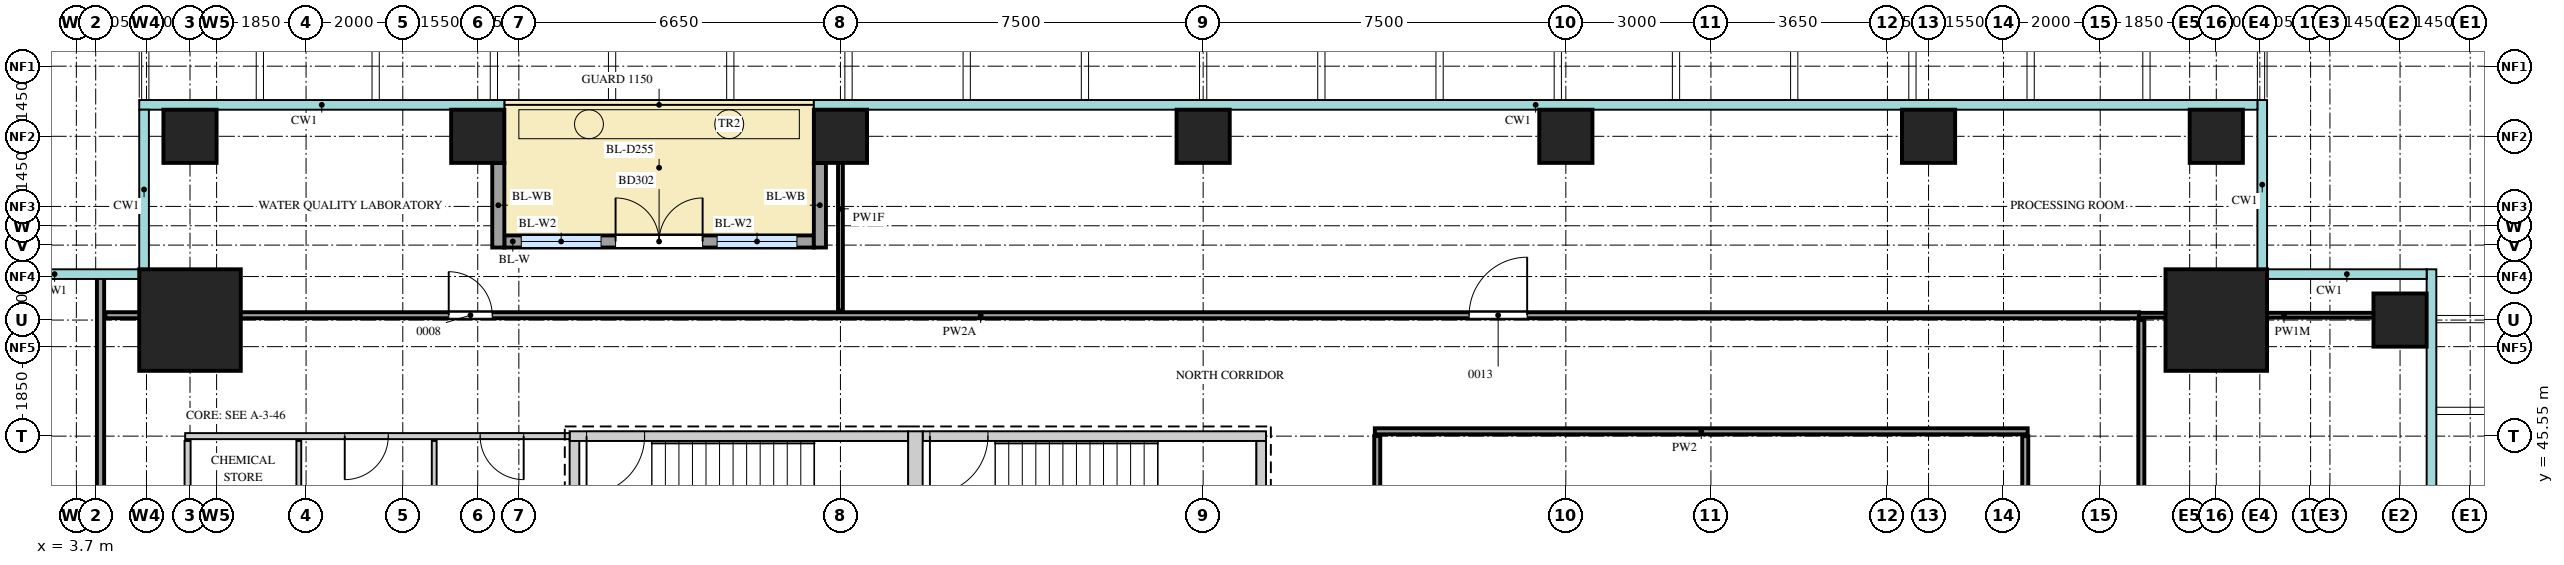
"""IFC4 building model, lengths in metres.
Left out: names, types, materials, properties, quantities, classifications, styles, units other than length and angle.
Written with IfcOpenShell. Run it as: python <this file> out.ifc"""

import sys

from ifc_helpers import new_model, si_unit, direction, frame, frame_2d, origin, origin_2d, place, context, subcontext, project, spatial, rectangle, extrude, source, transform, mapped, element, fill, save


model = new_model("IFC4")
c1 = context("Model", 3, precision=1e-05, world=origin(), true_north=direction((0.0, 1.0)))
c2 = subcontext(c1, "Body", "Model", "MODEL_VIEW")
j1 = project(units=[si_unit("LENGTHUNIT", "METRE"), si_unit("PLANEANGLEUNIT", "RADIAN")], contexts=[c1])
p1 = place(None, origin())
s1 = spatial("IfcSite", under=j1, at=p1, CompositionType="ELEMENT")
p2 = place(p1, origin())
s2 = spatial("IfcBuilding", under=s1, at=p2, CompositionType="ELEMENT")
p3 = place(p2, frame((0.0, 0.0, 141.1)))
s3 = spatial("IfcBuildingStorey", under=s2, at=p3, CompositionType="ELEMENT", Elevation=141.1)
m1 = source(origin(), c2, "Body", "SweptSolid", [
    extrude(rectangle(XDim=7.0, YDim=0.2, at=frame_2d((3.5, 0.0))), origin(), (0.0, 0.0, 1.0), 4.1),
])
p4 = place(p3, frame((13.9, 45.55, 0.0), z_axis=(0.0, 0.0, 1.0), x_axis=(1.0, 0.0, 0.0)))
e1 = element("IfcWall", 1, at=p4, inside=s3, PredefinedType="SHEAR", context=c2, shape_type="MappedRepresentation", body=[
    mapped(m1, transform((0.0, 0.0, 0.0))),
])
m2 = source(origin(), c2, "Body", "SweptSolid", [
    extrude(rectangle(XDim=1.2, YDim=2.1, at=frame_2d((0.6, 1.05))), frame((0.0, 0.11, 0.0), z_axis=(0.0, -1.0, 0.0), x_axis=(1.0, 0.0, 0.0)), (0.0, 0.0, 1.0), 0.22),
])
p5 = place(p4, frame((0.35, 0.0, 0.0)))
e2 = element("IfcOpeningElement", 2, at=p5, cuts=e1, PredefinedType="OPENING", context=c2, shape_type="MappedRepresentation", body=[
    mapped(m2, transform((0.0, 0.0, 0.0))),
])
m3 = source(origin(), c2, "Body", "SweptSolid", [
    extrude(rectangle(XDim=7.1, YDim=0.2, at=frame_2d((3.55, 0.0))), origin(), (0.0, 0.0, 1.0), 4.1),
])
p6 = place(p3, frame((21.2, 45.55, 0.0), z_axis=(0.0, 0.0, 1.0), x_axis=(1.0, 0.0, 0.0)))
e3 = element("IfcWall", 3, at=p6, inside=s3, PredefinedType="SHEAR", context=c2, shape_type="MappedRepresentation", body=[
    mapped(m3, transform((0.0, 0.0, 0.0))),
])
p7 = place(p6, frame((0.15, 0.0, 0.0)))
e4 = element("IfcOpeningElement", 4, at=p7, cuts=e3, PredefinedType="OPENING", context=c2, shape_type="MappedRepresentation", body=[
    mapped(m2, transform((0.0, 0.0, 0.0))),
])
m4 = source(origin(), c2, "Body", "SweptSolid", [
    extrude(rectangle(XDim=3.75, YDim=0.3, at=frame_2d((1.875, 0.0))), origin(), (0.0, 0.0, 1.0), 4.1),
])
p8 = place(p3, frame((21.05, 41.9, 0.0), z_axis=(0.0, 0.0, 1.0), x_axis=(0.0, 1.0, 0.0)))
e5 = element("IfcWall", 5, at=p8, inside=s3, PredefinedType="SHEAR", context=c2, shape_type="MappedRepresentation", body=[
    mapped(m4, transform((0.0, 0.0, 0.0))),
])
m5 = source(origin(), c2, "Body", "SweptSolid", [
    extrude(rectangle(XDim=3.35, YDim=0.2, at=frame_2d((1.675, 0.0))), origin(), (0.0, 0.0, 1.0), 4.1),
])
for number, where, z_axis, x_axis in (
    (6, (14.0, 42.1, 0.0), (0.0, 0.0, 1.0), (0.0, 1.0, 0.0)),
    (7, (28.2, 42.1, 0.0), (0.0, 0.0, 1.0), (0.0, 1.0, 0.0)),
):
    element("IfcWall", number, at=place(p3, frame(where, z_axis=z_axis, x_axis=x_axis)), inside=s3, PredefinedType="SHEAR", context=c2, shape_type="MappedRepresentation", body=[
        mapped(m5, transform((0.0, 0.0, 0.0))),
    ])
m6 = source(origin(), c2, "Body", "SweptSolid", [
    extrude(rectangle(XDim=2.1, YDim=2.1, at=origin_2d()), origin(), (0.0, 0.0, 1.0), 4.4),
])
for number, where, z_axis, x_axis in (
    (8, (47.95, 47.95, 0.0), (0.0, 0.0, 1.0), (1.0, 0.0, 0.0)),
    (9, (6.05, 47.95, 0.0), (0.0, 0.0, 1.0), (1.0, 0.0, 0.0)),
):
    element("IfcColumn", number, at=place(p3, frame(where, z_axis=z_axis, x_axis=x_axis)), inside=s3, PredefinedType="COLUMN", context=c2, shape_type="MappedRepresentation", body=[
        mapped(m6, transform((0.0, 0.0, 0.0))),
    ])
m7 = source(origin(), c2, "Body", "SweptSolid", [
    extrude(rectangle(XDim=1.1, YDim=1.1, at=origin_2d()), origin(), (0.0, 0.0, 1.0), 4.1),
])
for number, where, z_axis, x_axis in (
    (10, (51.75, 47.95, 0.0), (0.0, 0.0, 1.0), (1.0, 0.0, 0.0)),
    (11, (6.05, 51.75, 0.0), (0.0, 0.0, 1.0), (1.0, 0.0, 0.0)),
    (12, (12.0, 51.75, 0.0), (0.0, 0.0, 1.0), (1.0, 0.0, 0.0)),
    (13, (19.5, 51.75, 0.0), (0.0, 0.0, 1.0), (1.0, 0.0, 0.0)),
    (14, (27.0, 51.75, 0.0), (0.0, 0.0, 1.0), (1.0, 0.0, 0.0)),
    (15, (34.5, 51.75, 0.0), (0.0, 0.0, 1.0), (1.0, 0.0, 0.0)),
    (16, (42.0, 51.75, 0.0), (0.0, 0.0, 1.0), (1.0, 0.0, 0.0)),
    (17, (47.95, 51.75, 0.0), (0.0, 0.0, 1.0), (1.0, 0.0, 0.0)),
):
    element("IfcColumn", number, at=place(p3, frame(where, z_axis=z_axis, x_axis=x_axis)), inside=s3, PredefinedType="COLUMN", context=c2, shape_type="MappedRepresentation", body=[
        mapped(m7, transform((0.0, 0.0, 0.0))),
    ])
m8 = source(origin(), c2, "Body", "SweptSolid", [
    extrude(rectangle(XDim=6.4, YDim=0.25, at=frame_2d((3.2, 0.0))), origin(), (0.0, 0.0, 1.0), 4.1),
])
p9 = place(p3, frame((12.55, 49.575, 0.0), z_axis=(0.0, 0.0, 1.0), x_axis=(1.0, 0.0, 0.0)))
e18 = element("IfcWall", 18, at=p9, inside=s3, PredefinedType="SOLIDWALL", context=c2, shape_type="MappedRepresentation", body=[
    mapped(m8, transform((0.0, 0.0, 0.0))),
])
m9 = source(origin(), c2, "Body", "SweptSolid", [
    extrude(rectangle(XDim=1.65, YDim=2.4, at=frame_2d((0.825, 1.2))), frame((0.0, 0.135, 0.0), z_axis=(0.0, -1.0, 0.0), x_axis=(1.0, 0.0, 0.0)), (0.0, 0.0, 1.0), 0.27),
])
p10 = place(p9, frame((0.35, 0.0, 0.0)))
e19 = element("IfcOpeningElement", 19, at=p10, cuts=e18, PredefinedType="OPENING", context=c2, shape_type="MappedRepresentation", body=[
    mapped(m9, transform((0.0, 0.0, 0.0))),
])
p11 = place(p9, frame((4.4, 0.0, 0.0)))
e20 = element("IfcOpeningElement", 20, at=p11, cuts=e18, PredefinedType="OPENING", context=c2, shape_type="MappedRepresentation", body=[
    mapped(m9, transform((0.0, 0.0, 0.0))),
])
m10 = source(origin(), c2, "Body", "SweptSolid", [
    extrude(rectangle(XDim=1.8, YDim=2.4, at=frame_2d((0.9, 1.2))), frame((0.0, 0.135, 0.0), z_axis=(0.0, -1.0, 0.0), x_axis=(1.0, 0.0, 0.0)), (0.0, 0.0, 1.0), 0.27),
])
p12 = place(p9, frame((2.3, 0.0, 0.0)))
e21 = element("IfcOpeningElement", 21, at=p12, cuts=e18, PredefinedType="OPENING", context=c2, shape_type="MappedRepresentation", body=[
    mapped(m10, transform((0.0, 0.0, 0.0))),
])
m11 = source(origin(), c2, "Body", "SweptSolid", [
    extrude(rectangle(XDim=1.75, YDim=0.25, at=frame_2d((0.875, 0.0))), origin(), (0.0, 0.0, 1.0), 3.8),
])
for number, where, z_axis, x_axis in (
    (22, (12.425, 51.2, 0.0), (0.0, 0.0, 1.0), (0.0, -1.0, 0.0)),
    (23, (19.075, 51.2, 0.0), (0.0, 0.0, 1.0), (0.0, -1.0, 0.0)),
):
    element("IfcWall", number, at=place(p3, frame(where, z_axis=z_axis, x_axis=x_axis)), inside=s3, PredefinedType="SOLIDWALL", context=c2, shape_type="MappedRepresentation", body=[
        mapped(m11, transform((0.0, 0.0, 0.0))),
    ])
m12 = source(origin(), c2, "Body", "SweptSolid", [
    extrude(rectangle(XDim=43.7, YDim=0.15, at=frame_2d((21.85, 0.0))), origin(), (0.0, 0.0, 1.0), 4.2),
])
p13 = place(p3, frame((4.2, 5.15, 0.0), z_axis=(0.0, 0.0, 1.0), x_axis=(0.0, 1.0, 0.0)))
e24 = element("IfcWall", 24, at=p13, inside=s3, PredefinedType="PARTITIONING", context=c2, shape_type="MappedRepresentation", body=[
    mapped(m12, transform((0.0, 0.0, 0.0))),
])
m13 = source(origin(), c2, "Body", "SweptSolid", [
    extrude(rectangle(XDim=0.9, YDim=2.1, at=frame_2d((0.45, 1.05))), frame((0.0, 0.085, 0.0), z_axis=(0.0, -1.0, 0.0), x_axis=(1.0, 0.0, 0.0)), (0.0, 0.0, 1.0), 0.17),
])
p14 = place(p13, frame((20.1, 0.0, 0.0)))
e25 = element("IfcOpeningElement", 25, at=p14, cuts=e24, PredefinedType="OPENING", context=c2, shape_type="MappedRepresentation", body=[
    mapped(m13, transform((0.0, 0.0, 0.0))),
])
m14 = source(origin(), c2, "Body", "SweptSolid", [
    extrude(rectangle(XDim=32.85, YDim=0.125, at=frame_2d((16.425, 0.0))), origin(), (0.0, 0.0, 1.0), 4.2),
])
p15 = place(p3, frame((44.0, 12.7, 0.0), z_axis=(0.0, 0.0, 1.0), x_axis=(0.0, 1.0, 0.0)))
e26 = element("IfcWall", 26, at=p15, inside=s3, PredefinedType="PARTITIONING", context=c2, shape_type="MappedRepresentation", body=[
    mapped(m14, transform((0.0, 0.0, 0.0))),
])
m15 = source(origin(), c2, "Body", "SweptSolid", [
    extrude(rectangle(XDim=1.2, YDim=2.1, at=frame_2d((0.6, 1.05))), frame((0.0, 0.073, 0.0), z_axis=(0.0, -1.0, 0.0), x_axis=(1.0, 0.0, 0.0)), (0.0, 0.0, 1.0), 0.145),
])
p16 = place(p15, frame((13.7, 0.0, 0.0)))
e27 = element("IfcOpeningElement", 27, at=p16, cuts=e26, PredefinedType="OPENING", context=c2, shape_type="MappedRepresentation", body=[
    mapped(m15, transform((0.0, 0.0, 0.0))),
])
p17 = place(p15, frame((27.5, 0.0, 0.0)))
e28 = element("IfcOpeningElement", 28, at=p17, cuts=e26, PredefinedType="OPENING", context=c2, shape_type="MappedRepresentation", body=[
    mapped(m15, transform((0.0, 0.0, 0.0))),
])
m16 = source(origin(), c2, "Body", "SweptSolid", [
    extrude(rectangle(XDim=13.35, YDim=0.125, at=frame_2d((6.675, 0.0))), origin(), (0.0, 0.0, 1.0), 4.2),
])
p18 = place(p3, frame((46.4, 34.6, 0.0), z_axis=(0.0, 0.0, 1.0), x_axis=(0.0, 1.0, 0.0)))
e29 = element("IfcWall", 29, at=p18, inside=s3, PredefinedType="PARTITIONING", context=c2, shape_type="MappedRepresentation", body=[
    mapped(m16, transform((0.0, 0.0, 0.0))),
])
p19 = place(p18, frame((4.9, 0.0, 0.0)))
e30 = element("IfcOpeningElement", 30, at=p19, cuts=e29, PredefinedType="OPENING", context=c2, shape_type="MappedRepresentation", body=[
    mapped(m15, transform((0.0, 0.0, 0.0))),
])
m17 = source(origin(), c2, "Body", "SweptSolid", [
    extrude(rectangle(XDim=9.45, YDim=0.125, at=frame_2d((4.725, 0.0))), origin(), (0.0, 0.0, 1.0), 4.2),
])
p20 = place(p3, frame((30.6, 36.1, 0.0), z_axis=(0.0, 0.0, 1.0), x_axis=(0.0, 1.0, 0.0)))
e31 = element("IfcWall", 31, at=p20, inside=s3, PredefinedType="PARTITIONING", context=c2, shape_type="MappedRepresentation", body=[
    mapped(m17, transform((0.0, 0.0, 0.0))),
])
m18 = source(origin(), c2, "Body", "SweptSolid", [
    extrude(rectangle(XDim=3.45, YDim=0.125, at=frame_2d((1.725, 0.0))), origin(), (0.0, 0.0, 1.0), 4.2),
])
p21 = place(p3, frame((6.0, 42.0, 0.0), z_axis=(0.0, 0.0, 1.0), x_axis=(0.0, 1.0, 0.0)))
e32 = element("IfcWall", 32, at=p21, inside=s3, PredefinedType="PARTITIONING", context=c2, shape_type="MappedRepresentation", body=[
    mapped(m18, transform((0.0, 0.0, 0.0))),
])
m19 = source(origin(), c2, "Body", "SweptSolid", [
    extrude(rectangle(XDim=0.9, YDim=2.1, at=frame_2d((0.45, 1.05))), frame((0.0, 0.073, 0.0), z_axis=(0.0, -1.0, 0.0), x_axis=(1.0, 0.0, 0.0)), (0.0, 0.0, 1.0), 0.145),
])
p22 = place(p21, frame((1.2, 0.0, 0.0)))
e33 = element("IfcOpeningElement", 33, at=p22, cuts=e32, PredefinedType="OPENING", context=c2, shape_type="MappedRepresentation", body=[
    mapped(m19, transform((0.0, 0.0, 0.0))),
])
m20 = source(origin(), c2, "Body", "SweptSolid", [
    extrude(rectangle(XDim=3.45, YDim=0.1, at=frame_2d((1.725, 0.0))), origin(), (0.0, 0.0, 1.0), 4.2),
])
for number, where, z_axis, x_axis in (
    (34, (8.3, 42.0, 0.0), (0.0, 0.0, 1.0), (0.0, 1.0, 0.0)),
    (35, (11.1, 42.0, 0.0), (0.0, 0.0, 1.0), (0.0, 1.0, 0.0)),
):
    element("IfcWall", number, at=place(p3, frame(where, z_axis=z_axis, x_axis=x_axis)), inside=s3, PredefinedType="PARTITIONING", context=c2, shape_type="MappedRepresentation", body=[
        mapped(m20, transform((0.0, 0.0, 0.0))),
    ])
m21 = source(origin(), c2, "Body", "SweptSolid", [
    extrude(rectangle(XDim=7.95, YDim=0.125, at=frame_2d((3.975, 0.0))), origin(), (0.0, 0.0, 1.0), 4.2),
])
p23 = place(p3, frame((5.95, 45.55, 0.0), z_axis=(0.0, 0.0, 1.0), x_axis=(1.0, 0.0, 0.0)))
e36 = element("IfcWall", 36, at=p23, inside=s3, PredefinedType="PARTITIONING", context=c2, shape_type="MappedRepresentation", body=[
    mapped(m21, transform((0.0, 0.0, 0.0))),
])
p24 = place(p23, frame((3.3, 0.0, 0.0)))
e37 = element("IfcOpeningElement", 37, at=p24, cuts=e36, PredefinedType="OPENING", context=c2, shape_type="MappedRepresentation", body=[
    mapped(m19, transform((0.0, 0.0, 0.0))),
])
p25 = place(p23, frame((6.1, 0.0, 0.0)))
e38 = element("IfcOpeningElement", 38, at=p25, cuts=e36, PredefinedType="OPENING", context=c2, shape_type="MappedRepresentation", body=[
    mapped(m19, transform((0.0, 0.0, 0.0))),
])
m22 = source(origin(), c2, "Body", "SweptSolid", [
    extrude(rectangle(XDim=13.5, YDim=0.125, at=frame_2d((6.75, 0.0))), origin(), (0.0, 0.0, 1.0), 4.2),
])
p26 = place(p3, frame((30.55, 45.65, 0.0), z_axis=(0.0, 0.0, 1.0), x_axis=(1.0, 0.0, 0.0)))
e39 = element("IfcWall", 39, at=p26, inside=s3, PredefinedType="PARTITIONING", context=c2, shape_type="MappedRepresentation", body=[
    mapped(m22, transform((0.0, 0.0, 0.0))),
])
m23 = source(origin(), c2, "Body", "SweptSolid", [
    extrude(rectangle(XDim=42.05, YDim=0.125, at=frame_2d((21.025, 0.0))), origin(), (0.0, 0.0, 1.0), 3.55),
])
p27 = place(p3, frame((4.3, 48.05, 0.0), z_axis=(0.0, 0.0, 1.0), x_axis=(1.0, 0.0, 0.0)))
e40 = element("IfcWall", 40, at=p27, inside=s3, PredefinedType="PARTITIONING", context=c2, shape_type="MappedRepresentation", body=[
    mapped(m23, transform((0.0, 0.0, 0.0))),
])
p28 = place(p27, frame((7.1, 0.0, 0.0)))
e41 = element("IfcOpeningElement", 41, at=p28, cuts=e40, PredefinedType="OPENING", context=c2, shape_type="MappedRepresentation", body=[
    mapped(m19, transform((0.0, 0.0, 0.0))),
])
p29 = place(p27, frame((28.2, 0.0, 0.0)))
e42 = element("IfcOpeningElement", 42, at=p29, cuts=e40, PredefinedType="OPENING", context=c2, shape_type="MappedRepresentation", body=[
    mapped(m15, transform((0.0, 0.0, 0.0))),
])
m24 = source(origin(), c2, "Body", "SweptSolid", [
    extrude(rectangle(XDim=6.0, YDim=0.1, at=frame_2d((3.0, 0.0))), origin(), (0.0, 0.0, 1.0), 3.55),
])
p30 = place(p3, frame((46.35, 48.05, 0.0), z_axis=(0.0, 0.0, 1.0), x_axis=(1.0, 0.0, 0.0)))
e43 = element("IfcWall", 43, at=p30, inside=s3, PredefinedType="PARTITIONING", context=c2, shape_type="MappedRepresentation", body=[
    mapped(m24, transform((0.0, 0.0, 0.0))),
])
m25 = source(origin(), c2, "Body", "SweptSolid", [
    extrude(rectangle(XDim=4.2, YDim=0.1, at=frame_2d((2.1, 0.0))), origin(), (0.0, 0.0, 1.0), 3.77),
])
p31 = place(p3, frame((19.5, 48.15, 0.0), z_axis=(0.0, 0.0, 1.0), x_axis=(0.0, 1.0, 0.0)))
e44 = element("IfcWall", 44, at=p31, inside=s3, PredefinedType="PARTITIONING", context=c2, shape_type="MappedRepresentation", body=[
    mapped(m25, transform((0.0, 0.0, 0.0))),
])
m26 = source(origin(), c2, "Body", "SweptSolid", [
    extrude(rectangle(XDim=1.65, YDim=2.4, at=frame_2d((0.825, 1.2))), frame((0.0, 0.03, 0.0), z_axis=(0.0, -1.0, 0.0), x_axis=(1.0, 0.0, 0.0)), (0.0, 0.0, 1.0), 0.06),
])
p32 = place(p10, origin())
e45 = element("IfcWindow", 45, at=p32, inside=s3, PartitioningType="SINGLE_PANEL", PredefinedType="WINDOW", context=c2, shape_type="MappedRepresentation", body=[
    mapped(m26, transform((0.0, 0.0, 0.0))),
])
fill(e19, e45)
p33 = place(p11, origin())
e46 = element("IfcWindow", 46, at=p33, inside=s3, PartitioningType="SINGLE_PANEL", PredefinedType="WINDOW", context=c2, shape_type="MappedRepresentation", body=[
    mapped(m26, transform((0.0, 0.0, 0.0))),
])
fill(e20, e46)
m27 = source(origin(), c2, "Body", "SweptSolid", [
    extrude(rectangle(XDim=1.8, YDim=2.4, at=frame_2d((0.9, 1.2))), frame((0.0, 0.025, 0.0), z_axis=(0.0, -1.0, 0.0), x_axis=(1.0, 0.0, 0.0)), (0.0, 0.0, 1.0), 0.05),
])
p34 = place(p12, origin())
e47 = element("IfcDoor", 47, at=p34, inside=s3, OperationType="DOUBLE_DOOR_DOUBLE_SWING", PredefinedType="DOOR", context=c2, shape_type="MappedRepresentation", body=[
    mapped(m27, transform((0.0, 0.0, 0.0))),
])
fill(e21, e47)
m28 = source(origin(), c2, "Body", "SweptSolid", [
    extrude(rectangle(XDim=0.9, YDim=2.1, at=frame_2d((0.45, 1.05))), frame((0.0, 0.025, 0.0), z_axis=(0.0, -1.0, 0.0), x_axis=(1.0, 0.0, 0.0)), (0.0, 0.0, 1.0), 0.05),
])
p35 = place(p28, origin())
e48 = element("IfcDoor", 48, at=p35, inside=s3, OperationType="SINGLE_SWING_RIGHT", PredefinedType="DOOR", context=c2, shape_type="MappedRepresentation", body=[
    mapped(m28, transform((0.0, 0.0, 0.0))),
])
fill(e41, e48)
m29 = source(origin(), c2, "Body", "SweptSolid", [
    extrude(rectangle(XDim=1.2, YDim=2.1, at=frame_2d((0.6, 1.05))), frame((0.0, 0.025, 0.0), z_axis=(0.0, -1.0, 0.0), x_axis=(1.0, 0.0, 0.0)), (0.0, 0.0, 1.0), 0.05),
])
p36 = place(p29, origin())
e49 = element("IfcDoor", 49, at=p36, inside=s3, OperationType="SINGLE_SWING_LEFT", PredefinedType="DOOR", context=c2, shape_type="MappedRepresentation", body=[
    mapped(m29, transform((0.0, 0.0, 0.0))),
])
fill(e42, e49)
p37 = place(p24, origin())
e50 = element("IfcDoor", 50, at=p37, inside=s3, OperationType="SINGLE_SWING_LEFT", PredefinedType="DOOR", context=c2, shape_type="MappedRepresentation", body=[
    mapped(m28, transform((0.0, 0.0, 0.0))),
])
fill(e37, e50)
p38 = place(p25, origin())
e51 = element("IfcDoor", 51, at=p38, inside=s3, OperationType="SINGLE_SWING_RIGHT", PredefinedType="DOOR", context=c2, shape_type="MappedRepresentation", body=[
    mapped(m28, transform((0.0, 0.0, 0.0))),
])
fill(e38, e51)
p39 = place(p5, origin())
e52 = element("IfcDoor", 52, at=p39, inside=s3, OperationType="SINGLE_SWING_LEFT", PredefinedType="DOOR", context=c2, shape_type="MappedRepresentation", body=[
    mapped(m29, transform((0.0, 0.0, 0.0))),
])
fill(e2, e52)
p40 = place(p7, origin())
e53 = element("IfcDoor", 53, at=p40, inside=s3, OperationType="SINGLE_SWING_LEFT", PredefinedType="DOOR", context=c2, shape_type="MappedRepresentation", body=[
    mapped(m29, transform((0.0, 0.0, 0.0))),
])
fill(e4, e53)
save(model, sys.argv[1])
